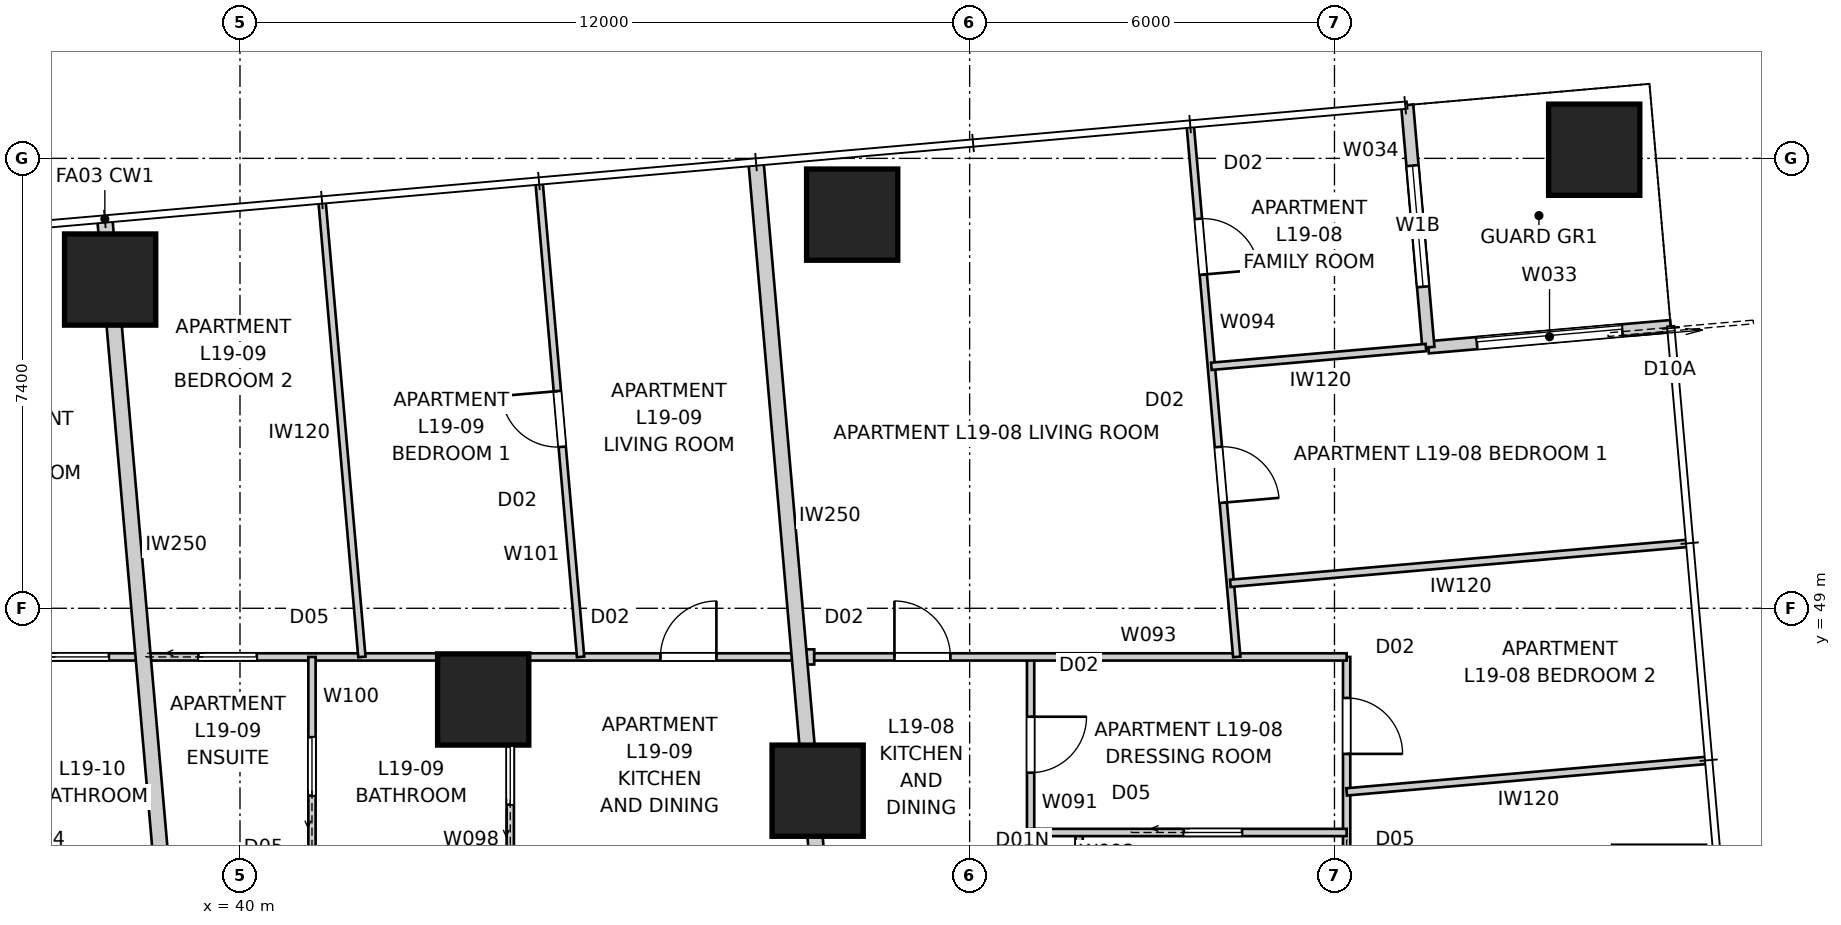
"""IFC4 building model, lengths in metres.
Left out: names, types, materials, properties, quantities, classifications, styles, units other than length and angle.
Written with IfcOpenShell. Run it as: python <this file> out.ifc"""

import sys

from ifc_helpers import new_model, si_unit, direction, frame, frame_2d, origin, origin_2d, place, context, subcontext, project, spatial, rectangle, extrude, element, fill, save


model = new_model("IFC4")
c1 = context("Model", 3, precision=1e-05, world=origin(), true_north=direction((0.0, 1.0)))
c2 = subcontext(c1, "Body", "Model", "MODEL_VIEW")
j1 = project(units=[si_unit("LENGTHUNIT", "METRE"), si_unit("PLANEANGLEUNIT", "RADIAN")], contexts=[c1])
p1 = place(None, origin())
s1 = spatial("IfcSite", under=j1, at=p1, CompositionType="ELEMENT")
p2 = place(p1, origin())
s2 = spatial("IfcBuilding", under=s1, at=p2, CompositionType="ELEMENT")
p3 = place(p2, frame((0.0, 0.0, 71.0)))
s3 = spatial("IfcBuildingStorey", under=s2, at=p3, CompositionType="ELEMENT", Elevation=71.0)
for number, where, z_axis, x_axis in (
    (1, (62.271, 56.542, 0.0), (0.0, 0.0, 1.0), (1.0, 0.0, 0.0)),
    (2, (50.068, 55.474, 0.0), (0.0, 0.0, 1.0), (1.0, 0.0, 0.0)),
    (3, (37.865, 54.407, 0.0), (0.0, 0.0, 1.0), (1.0, 0.0, 0.0)),
):
    element("IfcColumn", number, at=place(p3, frame(where, z_axis=z_axis, x_axis=x_axis)), inside=s3, PredefinedType="COLUMN", context=c2, shape_type="SweptSolid", body=[
        extrude(rectangle(XDim=1.5, YDim=1.5, at=origin_2d()), origin(), (0.0, 0.0, 1.0), 3.2),
    ])
for number, where, z_axis, x_axis in (
    (4, (49.5, 46.0, 0.0), (0.0, 0.0, 1.0), (1.0, 0.0, 0.0)),
    (5, (44.0, 47.5, 0.0), (0.0, 0.0, 1.0), (1.0, 0.0, 0.0)),
):
    element("IfcColumn", number, at=place(p3, frame(where, z_axis=z_axis, x_axis=x_axis)), inside=s3, PredefinedType="COLUMN", context=c2, shape_type="SweptSolid", body=[
        extrude(rectangle(XDim=1.5, YDim=1.5, at=origin_2d()), origin(), (0.0, 0.0, 1.0), 3.4),
    ])
p4 = place(p3, frame((63.529, 53.641, 0.0), z_axis=(0.0, 0.0, 1.0), x_axis=(-0.99619418125, -0.087161650072, 0.0)))
e6 = element("IfcWall", 6, at=p4, inside=s3, PredefinedType="SOLIDWALL", context=c2, shape_type="SweptSolid", body=[
    extrude(rectangle(XDim=4.0, YDim=0.2, at=frame_2d((2.0, 0.0))), origin(), (0.0, 0.0, 1.0), 3.2),
])
p5 = place(p4, frame((0.8, 0.0, 0.0)))
e7 = element("IfcOpeningElement", 7, at=p5, cuts=e6, PredefinedType="OPENING", context=c2, shape_type="SweptSolid", body=[
    extrude(rectangle(XDim=2.4, YDim=2.1, at=frame_2d((1.2, 1.05))), frame((0.0, 0.11, 0.0), z_axis=(0.0, -1.0, 0.0), x_axis=(1.0, 0.0, 0.0)), (0.0, 0.0, 1.0), 0.22),
])
p6 = place(p3, frame((59.544, 53.292, 0.0), z_axis=(0.0, 0.0, 1.0), x_axis=(-0.087156350505, 0.99619464492, 0.0)))
e8 = element("IfcWall", 8, at=p6, inside=s3, PredefinedType="SOLIDWALL", context=c2, shape_type="SweptSolid", body=[
    extrude(rectangle(XDim=4.0, YDim=0.2, at=frame_2d((2.0, 0.0))), origin(), (0.0, 0.0, 1.0), 3.2),
])
p7 = place(p6, frame((1.0, 0.0, 0.4)))
e9 = element("IfcOpeningElement", 9, at=p7, cuts=e8, PredefinedType="OPENING", context=c2, shape_type="SweptSolid", body=[
    extrude(rectangle(XDim=2.0, YDim=1.8, at=frame_2d((1.0, 0.9))), frame((0.0, 0.11, 0.0), z_axis=(0.0, -1.0, 0.0), x_axis=(1.0, 0.0, 0.0)), (0.0, 0.0, 1.0), 0.22),
])
p8 = place(p3, frame((48.487, 56.34, 0.0), z_axis=(0.0, 0.0, 1.0), x_axis=(0.087168232078, -0.996193605338, 0.0)))
e10 = element("IfcWall", 10, at=p8, inside=s3, PredefinedType="PARTITIONING", context=c2, shape_type="SweptSolid", body=[
    extrude(rectangle(XDim=11.814, YDim=0.25, at=frame_2d((5.907, 0.0))), origin(), (0.0, 0.0, 1.0), 3.2),
])
p9 = place(p3, frame((37.778, 55.403, 0.0), z_axis=(0.0, 0.0, 1.0), x_axis=(0.087140211333, -0.996196056792, 0.0)))
e11 = element("IfcWall", 11, at=p9, inside=s3, PredefinedType="PARTITIONING", context=c2, shape_type="SweptSolid", body=[
    extrude(rectangle(XDim=10.873, YDim=0.25, at=frame_2d((5.437, 0.0))), origin(), (0.0, 0.0, 1.0), 3.2),
])
p10 = place(p3, frame((49.223, 48.2, 0.0), z_axis=(0.0, 0.0, 1.0), x_axis=(0.999999388167, -0.001106194013, 0.0)))
e12 = element("IfcWall", 12, at=p10, inside=s3, PredefinedType="PARTITIONING", context=c2, shape_type="SweptSolid", body=[
    extrude(rectangle(XDim=0.221, YDim=0.25, at=frame_2d((0.11, 0.0))), origin(), (0.0, 0.0, 1.0), 3.2),
])
p11 = place(p3, frame((58.2, 48.2, 0.0), z_axis=(0.0, 0.0, 1.0), x_axis=(0.0, -1.0, 0.0)))
e13 = element("IfcWall", 13, at=p11, inside=s3, PredefinedType="PARTITIONING", context=c2, shape_type="SweptSolid", body=[
    extrude(rectangle(XDim=20.7, YDim=0.12, at=frame_2d((10.35, 0.0))), origin(), (0.0, 0.0, 1.0), 3.2),
])
p12 = place(p11, frame((15.095, 0.0, 0.0)))
e14 = element("IfcOpeningElement", 14, at=p12, cuts=e13, PredefinedType="OPENING", context=c2, shape_type="SweptSolid", body=[
    extrude(rectangle(XDim=0.92, YDim=2.34, at=frame_2d((0.46, 1.17))), frame((0.0, 0.07, 0.0), z_axis=(0.0, -1.0, 0.0), x_axis=(1.0, 0.0, 0.0)), (0.0, 0.0, 1.0), 0.14),
])
p13 = place(p11, frame((18.521, 0.0, 0.0)))
e15 = element("IfcOpeningElement", 15, at=p13, cuts=e13, PredefinedType="OPENING", context=c2, shape_type="SweptSolid", body=[
    extrude(rectangle(XDim=0.96, YDim=2.1, at=frame_2d((0.48, 1.05))), frame((0.0, 0.07, 0.0), z_axis=(0.0, -1.0, 0.0), x_axis=(1.0, 0.0, 0.0)), (0.0, 0.0, 1.0), 0.14),
])
p14 = place(p11, frame((0.675, 0.0, 0.0)))
e16 = element("IfcOpeningElement", 16, at=p14, cuts=e13, PredefinedType="OPENING", context=c2, shape_type="SweptSolid", body=[
    extrude(rectangle(XDim=0.92, YDim=2.34, at=frame_2d((0.46, 1.17))), frame((0.0, 0.07, 0.0), z_axis=(0.0, -1.0, 0.0), x_axis=(1.0, 0.0, 0.0)), (0.0, 0.0, 1.0), 0.14),
])
p15 = place(p11, frame((3.872, 0.0, 0.0)))
e17 = element("IfcOpeningElement", 17, at=p15, cuts=e13, PredefinedType="OPENING", context=c2, shape_type="SweptSolid", body=[
    extrude(rectangle(XDim=0.96, YDim=2.1, at=frame_2d((0.48, 1.05))), frame((0.0, 0.07, 0.0), z_axis=(0.0, -1.0, 0.0), x_axis=(1.0, 0.0, 0.0)), (0.0, 0.0, 1.0), 0.14),
])
p16 = place(p3, frame((53.8, 45.312, 0.0), z_axis=(0.0, 0.0, 1.0), x_axis=(0.0, -1.0, 0.0)))
e18 = element("IfcWall", 18, at=p16, inside=s3, PredefinedType="PARTITIONING", context=c2, shape_type="SweptSolid", body=[
    extrude(rectangle(XDim=0.812, YDim=0.12, at=frame_2d((0.406, 0.0))), origin(), (0.0, 0.0, 1.0), 3.2),
])
p17 = place(p3, frame((53.002, 48.2, 0.0), z_axis=(0.0, 0.0, 1.0), x_axis=(0.0, -1.0, 0.0)))
e19 = element("IfcWall", 19, at=p17, inside=s3, PredefinedType="PARTITIONING", context=c2, shape_type="SweptSolid", body=[
    extrude(rectangle(XDim=2.887, YDim=0.12, at=frame_2d((1.444, 0.0))), origin(), (0.0, 0.0, 1.0), 2.399),
])
p18 = place(p17, frame((0.984, 0.0, 0.0)))
e20 = element("IfcOpeningElement", 20, at=p18, cuts=e19, PredefinedType="OPENING", context=c2, shape_type="SweptSolid", body=[
    extrude(rectangle(XDim=0.92, YDim=2.34, at=frame_2d((0.46, 1.17))), frame((0.0, 0.07, 0.0), z_axis=(0.0, -1.0, 0.0), x_axis=(1.0, 0.0, 0.0)), (0.0, 0.0, 1.0), 0.14),
])
p19 = place(p3, frame((53.002, 45.312, 0.0), z_axis=(0.0, 0.0, 1.0), x_axis=(1.0, 0.0, 0.0)))
e21 = element("IfcWall", 21, at=p19, inside=s3, PredefinedType="PARTITIONING", context=c2, shape_type="SweptSolid", body=[
    extrude(rectangle(XDim=5.198, YDim=0.12, at=frame_2d((2.599, 0.0))), origin(), (0.0, 0.0, 1.0), 3.2),
])
p20 = place(p19, frame((2.518, 0.0, 0.0)))
e22 = element("IfcOpeningElement", 22, at=p20, cuts=e21, PredefinedType="OPENING", context=c2, shape_type="SweptSolid", body=[
    extrude(rectangle(XDim=0.96, YDim=2.1, at=frame_2d((0.48, 1.05))), frame((0.0, 0.07, 0.0), z_axis=(0.0, -1.0, 0.0), x_axis=(1.0, 0.0, 0.0)), (0.0, 0.0, 1.0), 0.14),
])
p21 = place(p3, frame((49.444, 48.2, 0.0), z_axis=(0.0, 0.0, 1.0), x_axis=(1.0, 0.0, 0.0)))
e23 = element("IfcWall", 23, at=p21, inside=s3, PredefinedType="PARTITIONING", context=c2, shape_type="SweptSolid", body=[
    extrude(rectangle(XDim=8.756, YDim=0.12, at=frame_2d((4.378, 0.0))), origin(), (0.0, 0.0, 1.0), 3.2),
])
p22 = place(p21, frame((1.319, 0.0, 0.0)))
e24 = element("IfcOpeningElement", 24, at=p22, cuts=e23, PredefinedType="OPENING", context=c2, shape_type="SweptSolid", body=[
    extrude(rectangle(XDim=0.92, YDim=2.34, at=frame_2d((0.46, 1.17))), frame((0.0, 0.07, 0.0), z_axis=(0.0, -1.0, 0.0), x_axis=(1.0, 0.0, 0.0)), (0.0, 0.0, 1.0), 0.14),
])
p23 = place(p3, frame((55.629, 56.925, 0.0), z_axis=(0.0, 0.0, 1.0), x_axis=(0.087169716747, -0.996193475426, 0.0)))
e25 = element("IfcWall", 25, at=p23, inside=s3, PredefinedType="PARTITIONING", context=c2, shape_type="SweptSolid", body=[
    extrude(rectangle(XDim=8.758, YDim=0.12, at=frame_2d((4.379, 0.0))), origin(), (0.0, 0.0, 1.0), 3.2),
])
p24 = place(p23, frame((1.525, 0.0, 0.0)))
e26 = element("IfcOpeningElement", 26, at=p24, cuts=e25, PredefinedType="OPENING", context=c2, shape_type="SweptSolid", body=[
    extrude(rectangle(XDim=0.92, YDim=2.34, at=frame_2d((0.46, 1.17))), frame((0.0, 0.07, 0.0), z_axis=(0.0, -1.0, 0.0), x_axis=(1.0, 0.0, 0.0)), (0.0, 0.0, 1.0), 0.14),
])
p25 = place(p23, frame((5.292, 0.0, 0.0)))
e27 = element("IfcOpeningElement", 27, at=p25, cuts=e25, PredefinedType="OPENING", context=c2, shape_type="SweptSolid", body=[
    extrude(rectangle(XDim=0.92, YDim=2.34, at=frame_2d((0.46, 1.17))), frame((0.0, 0.07, 0.0), z_axis=(0.0, -1.0, 0.0), x_axis=(1.0, 0.0, 0.0)), (0.0, 0.0, 1.0), 0.14),
])
p26 = place(p3, frame((63.802, 50.067, 0.0), z_axis=(0.0, 0.0, 1.0), x_axis=(-0.996194420069, -0.087158920508, 0.0)))
e28 = element("IfcWall", 28, at=p26, inside=s3, PredefinedType="PARTITIONING", context=c2, shape_type="SweptSolid", body=[
    extrude(rectangle(XDim=7.543, YDim=0.12, at=frame_2d((3.772, 0.0))), origin(), (0.0, 0.0, 1.0), 3.2),
])
p27 = place(p3, frame((55.975, 52.98, 0.0), z_axis=(0.0, 0.0, 1.0), x_axis=(0.996194166221, 0.087161821847, 0.0)))
e29 = element("IfcWall", 29, at=p27, inside=s3, PredefinedType="PARTITIONING", context=c2, shape_type="SweptSolid", body=[
    extrude(rectangle(XDim=3.543, YDim=0.12, at=frame_2d((1.771, 0.0))), origin(), (0.0, 0.0, 1.0), 3.2),
])
p28 = place(p3, frame((64.114, 46.498, 0.0), z_axis=(0.0, 0.0, 1.0), x_axis=(-0.996195547509, -0.087146033323, 0.0)))
e30 = element("IfcWall", 30, at=p28, inside=s3, PredefinedType="PARTITIONING", context=c2, shape_type="SweptSolid", body=[
    extrude(rectangle(XDim=5.937, YDim=0.12, at=frame_2d((2.968, 0.0))), origin(), (0.0, 0.0, 1.0), 2.399),
])
p29 = place(p3, frame((44.445, 44.6, 0.0), z_axis=(0.0, 0.0, 1.0), x_axis=(0.0, 1.0, 0.0)))
e31 = element("IfcWall", 31, at=p29, inside=s3, PredefinedType="PARTITIONING", context=c2, shape_type="SweptSolid", body=[
    extrude(rectangle(XDim=3.6, YDim=0.12, at=frame_2d((1.8, 0.0))), origin(), (0.0, 0.0, 1.0), 3.2),
])
p30 = place(p29, frame((1.17, 0.0, 0.0)))
e32 = element("IfcOpeningElement", 32, at=p30, cuts=e31, PredefinedType="OPENING", context=c2, shape_type="SweptSolid", body=[
    extrude(rectangle(XDim=0.96, YDim=2.1, at=frame_2d((0.48, 1.05))), frame((0.0, 0.07, 0.0), z_axis=(0.0, -1.0, 0.0), x_axis=(1.0, 0.0, 0.0)), (0.0, 0.0, 1.0), 0.14),
])
p31 = place(p3, frame((21.8, 48.2, 0.0), z_axis=(0.0, 0.0, 1.0), x_axis=(1.0, 0.0, 0.0)))
e33 = element("IfcWall", 33, at=p31, inside=s3, PredefinedType="PARTITIONING", context=c2, shape_type="SweptSolid", body=[
    extrude(rectangle(XDim=27.399, YDim=0.12, at=frame_2d((13.699, 0.0))), origin(), (0.0, 0.0, 1.0), 3.2),
])
p32 = place(p31, frame((7.18, 0.0, 0.0)))
e34 = element("IfcOpeningElement", 34, at=p32, cuts=e33, PredefinedType="OPENING", context=c2, shape_type="SweptSolid", body=[
    extrude(rectangle(XDim=0.92, YDim=2.34, at=frame_2d((0.46, 1.17))), frame((0.0, 0.07, 0.0), z_axis=(0.0, -1.0, 0.0), x_axis=(1.0, 0.0, 0.0)), (0.0, 0.0, 1.0), 0.14),
])
p33 = place(p31, frame((10.167, 0.0, 0.0)))
e35 = element("IfcOpeningElement", 35, at=p33, cuts=e33, PredefinedType="OPENING", context=c2, shape_type="SweptSolid", body=[
    extrude(rectangle(XDim=0.92, YDim=2.34, at=frame_2d((0.46, 1.17))), frame((0.0, 0.07, 0.0), z_axis=(0.0, -1.0, 0.0), x_axis=(1.0, 0.0, 0.0)), (0.0, 0.0, 1.0), 0.14),
])
p34 = place(p31, frame((25.115, 0.0, 0.0)))
e36 = element("IfcOpeningElement", 36, at=p34, cuts=e33, PredefinedType="OPENING", context=c2, shape_type="SweptSolid", body=[
    extrude(rectangle(XDim=0.92, YDim=2.34, at=frame_2d((0.46, 1.17))), frame((0.0, 0.07, 0.0), z_axis=(0.0, -1.0, 0.0), x_axis=(1.0, 0.0, 0.0)), (0.0, 0.0, 1.0), 0.14),
])
p35 = place(p31, frame((3.513, 0.0, 0.0)))
e37 = element("IfcOpeningElement", 37, at=p35, cuts=e33, PredefinedType="OPENING", context=c2, shape_type="SweptSolid", body=[
    extrude(rectangle(XDim=0.96, YDim=2.1, at=frame_2d((0.48, 1.05))), frame((0.0, 0.07, 0.0), z_axis=(0.0, -1.0, 0.0), x_axis=(1.0, 0.0, 0.0)), (0.0, 0.0, 1.0), 0.14),
])
p36 = place(p31, frame((0.655, 0.0, 0.0)))
e38 = element("IfcOpeningElement", 38, at=p36, cuts=e33, PredefinedType="OPENING", context=c2, shape_type="SweptSolid", body=[
    extrude(rectangle(XDim=0.96, YDim=2.1, at=frame_2d((0.48, 1.05))), frame((0.0, 0.07, 0.0), z_axis=(0.0, -1.0, 0.0), x_axis=(1.0, 0.0, 0.0)), (0.0, 0.0, 1.0), 0.14),
])
p37 = place(p31, frame((15.083, 0.0, 0.0)))
e39 = element("IfcOpeningElement", 39, at=p37, cuts=e33, PredefinedType="OPENING", context=c2, shape_type="SweptSolid", body=[
    extrude(rectangle(XDim=0.96, YDim=2.1, at=frame_2d((0.48, 1.05))), frame((0.0, 0.07, 0.0), z_axis=(0.0, -1.0, 0.0), x_axis=(1.0, 0.0, 0.0)), (0.0, 0.0, 1.0), 0.14),
])
p38 = place(p31, frame((17.516, 0.0, 0.0)))
e40 = element("IfcOpeningElement", 40, at=p38, cuts=e33, PredefinedType="OPENING", context=c2, shape_type="SweptSolid", body=[
    extrude(rectangle(XDim=0.96, YDim=2.1, at=frame_2d((0.48, 1.05))), frame((0.0, 0.07, 0.0), z_axis=(0.0, -1.0, 0.0), x_axis=(1.0, 0.0, 0.0)), (0.0, 0.0, 1.0), 0.14),
])
p39 = place(p3, frame((41.184, 44.6, 0.0), z_axis=(0.0, 0.0, 1.0), x_axis=(0.0, 1.0, 0.0)))
e41 = element("IfcWall", 41, at=p39, inside=s3, PredefinedType="PARTITIONING", context=c2, shape_type="SweptSolid", body=[
    extrude(rectangle(XDim=3.6, YDim=0.12, at=frame_2d((1.8, 0.0))), origin(), (0.0, 0.0, 1.0), 3.2),
])
p40 = place(p39, frame((1.32, 0.0, 0.0)))
e42 = element("IfcOpeningElement", 42, at=p40, cuts=e41, PredefinedType="OPENING", context=c2, shape_type="SweptSolid", body=[
    extrude(rectangle(XDim=0.96, YDim=2.1, at=frame_2d((0.48, 1.05))), frame((0.0, 0.07, 0.0), z_axis=(0.0, -1.0, 0.0), x_axis=(1.0, 0.0, 0.0)), (0.0, 0.0, 1.0), 0.14),
])
p41 = place(p3, frame((45.602, 48.2, 0.0), z_axis=(0.0, 0.0, 1.0), x_axis=(-0.087161914023, 0.996194158156, 0.0)))
e43 = element("IfcWall", 43, at=p41, inside=s3, PredefinedType="PARTITIONING", context=c2, shape_type="SweptSolid", body=[
    extrude(rectangle(XDim=7.818, YDim=0.12, at=frame_2d((3.909, 0.0))), origin(), (0.0, 0.0, 1.0), 2.588),
])
p42 = place(p41, frame((3.469, 0.0, 0.0)))
e44 = element("IfcOpeningElement", 44, at=p42, cuts=e43, PredefinedType="OPENING", context=c2, shape_type="SweptSolid", body=[
    extrude(rectangle(XDim=0.92, YDim=2.34, at=frame_2d((0.46, 1.17))), frame((0.0, 0.07, 0.0), z_axis=(0.0, -1.0, 0.0), x_axis=(1.0, 0.0, 0.0)), (0.0, 0.0, 1.0), 0.14),
])
p43 = place(p3, frame((42.005, 48.2, 0.0), z_axis=(0.0, 0.0, 1.0), x_axis=(-0.08715887855, 0.99619442374, 0.0)))
e45 = element("IfcWall", 45, at=p43, inside=s3, PredefinedType="PARTITIONING", context=c2, shape_type="SweptSolid", body=[
    extrude(rectangle(XDim=7.504, YDim=0.12, at=frame_2d((3.752, 0.0))), origin(), (0.0, 0.0, 1.0), 3.2),
])
p44 = place(p5, origin())
e46 = element("IfcDoor", 46, at=p44, inside=s3, OperationType="SLIDING_TO_LEFT", PredefinedType="DOOR", context=c2, shape_type="SweptSolid", body=[
    extrude(rectangle(XDim=2.4, YDim=2.1, at=frame_2d((1.2, 1.05))), frame((0.0, 0.025, 0.0), z_axis=(0.0, -1.0, 0.0), x_axis=(1.0, 0.0, 0.0)), (0.0, 0.0, 1.0), 0.05),
])
fill(e7, e46)
p45 = place(p7, origin())
e47 = element("IfcWindow", 47, at=p45, inside=s3, PartitioningType="SINGLE_PANEL", PredefinedType="WINDOW", context=c2, shape_type="SweptSolid", body=[
    extrude(rectangle(XDim=2.0, YDim=1.8, at=frame_2d((1.0, 0.9))), frame((0.0, 0.03, 0.0), z_axis=(0.0, -1.0, 0.0), x_axis=(1.0, 0.0, 0.0)), (0.0, 0.0, 1.0), 0.06),
])
fill(e9, e47)
p46 = place(p34, origin())
e48 = element("IfcDoor", 48, at=p46, inside=s3, OperationType="SINGLE_SWING_RIGHT", PredefinedType="DOOR", context=c2, shape_type="SweptSolid", body=[
    extrude(rectangle(XDim=0.92, YDim=2.34, at=frame_2d((0.46, 1.17))), frame((0.0, 0.025, 0.0), z_axis=(0.0, -1.0, 0.0), x_axis=(1.0, 0.0, 0.0)), (0.0, 0.0, 1.0), 0.05),
])
fill(e36, e48)
p47 = place(p30, origin())
e49 = element("IfcDoor", 49, at=p47, inside=s3, OperationType="SLIDING_TO_LEFT", PredefinedType="DOOR", context=c2, shape_type="SweptSolid", body=[
    extrude(rectangle(XDim=0.96, YDim=2.1, at=frame_2d((0.48, 1.05))), frame((0.0, 0.025, 0.0), z_axis=(0.0, -1.0, 0.0), x_axis=(1.0, 0.0, 0.0)), (0.0, 0.0, 1.0), 0.05),
])
fill(e32, e49)
p48 = place(p22, origin())
e50 = element("IfcDoor", 50, at=p48, inside=s3, OperationType="SINGLE_SWING_LEFT", PredefinedType="DOOR", context=c2, shape_type="SweptSolid", body=[
    extrude(rectangle(XDim=0.92, YDim=2.34, at=frame_2d((0.46, 1.17))), frame((0.0, 0.025, 0.0), z_axis=(0.0, -1.0, 0.0), x_axis=(1.0, 0.0, 0.0)), (0.0, 0.0, 1.0), 0.05),
])
fill(e24, e50)
p49 = place(p18, origin())
e51 = element("IfcDoor", 51, at=p49, inside=s3, OperationType="SINGLE_SWING_LEFT", PredefinedType="DOOR", context=c2, shape_type="SweptSolid", body=[
    extrude(rectangle(XDim=0.92, YDim=2.34, at=frame_2d((0.46, 1.17))), frame((0.0, 0.025, 0.0), z_axis=(0.0, -1.0, 0.0), x_axis=(1.0, 0.0, 0.0)), (0.0, 0.0, 1.0), 0.05),
])
fill(e20, e51)
p50 = place(p42, origin())
e52 = element("IfcDoor", 52, at=p50, inside=s3, OperationType="SINGLE_SWING_RIGHT", PredefinedType="DOOR", context=c2, shape_type="SweptSolid", body=[
    extrude(rectangle(XDim=0.92, YDim=2.34, at=frame_2d((0.46, 1.17))), frame((0.0, 0.025, 0.0), z_axis=(0.0, -1.0, 0.0), x_axis=(1.0, 0.0, 0.0)), (0.0, 0.0, 1.0), 0.05),
])
fill(e44, e52)
p51 = place(p40, origin())
e53 = element("IfcDoor", 53, at=p51, inside=s3, OperationType="SLIDING_TO_LEFT", PredefinedType="DOOR", context=c2, shape_type="SweptSolid", body=[
    extrude(rectangle(XDim=0.96, YDim=2.1, at=frame_2d((0.48, 1.05))), frame((0.0, 0.025, 0.0), z_axis=(0.0, -1.0, 0.0), x_axis=(1.0, 0.0, 0.0)), (0.0, 0.0, 1.0), 0.05),
])
fill(e42, e53)
p52 = place(p24, origin())
e54 = element("IfcDoor", 54, at=p52, inside=s3, OperationType="SINGLE_SWING_RIGHT", PredefinedType="DOOR", context=c2, shape_type="SweptSolid", body=[
    extrude(rectangle(XDim=0.92, YDim=2.34, at=frame_2d((0.46, 1.17))), frame((0.0, 0.025, 0.0), z_axis=(0.0, -1.0, 0.0), x_axis=(1.0, 0.0, 0.0)), (0.0, 0.0, 1.0), 0.05),
])
fill(e26, e54)
p53 = place(p25, origin())
e55 = element("IfcDoor", 55, at=p53, inside=s3, OperationType="SINGLE_SWING_RIGHT", PredefinedType="DOOR", context=c2, shape_type="SweptSolid", body=[
    extrude(rectangle(XDim=0.92, YDim=2.34, at=frame_2d((0.46, 1.17))), frame((0.0, 0.025, 0.0), z_axis=(0.0, -1.0, 0.0), x_axis=(1.0, 0.0, 0.0)), (0.0, 0.0, 1.0), 0.05),
])
fill(e27, e55)
p54 = place(p20, origin())
e56 = element("IfcDoor", 56, at=p54, inside=s3, OperationType="SLIDING_TO_LEFT", PredefinedType="DOOR", context=c2, shape_type="SweptSolid", body=[
    extrude(rectangle(XDim=0.96, YDim=2.1, at=frame_2d((0.48, 1.05))), frame((0.0, 0.025, 0.0), z_axis=(0.0, -1.0, 0.0), x_axis=(1.0, 0.0, 0.0)), (0.0, 0.0, 1.0), 0.05),
])
fill(e22, e56)
p55 = place(p14, origin())
e57 = element("IfcDoor", 57, at=p55, inside=s3, OperationType="SINGLE_SWING_RIGHT", PredefinedType="DOOR", context=c2, shape_type="SweptSolid", body=[
    extrude(rectangle(XDim=0.92, YDim=2.34, at=frame_2d((0.46, 1.17))), frame((0.0, 0.025, 0.0), z_axis=(0.0, -1.0, 0.0), x_axis=(1.0, 0.0, 0.0)), (0.0, 0.0, 1.0), 0.05),
])
fill(e16, e57)
p56 = place(p37, origin())
e58 = element("IfcDoor", 58, at=p56, inside=s3, OperationType="SLIDING_TO_LEFT", PredefinedType="DOOR", context=c2, shape_type="SweptSolid", body=[
    extrude(rectangle(XDim=0.96, YDim=2.1, at=frame_2d((0.48, 1.05))), frame((0.0, 0.025, 0.0), z_axis=(0.0, -1.0, 0.0), x_axis=(1.0, 0.0, 0.0)), (0.0, 0.0, 1.0), 0.05),
])
fill(e39, e58)
p57 = place(p38, origin())
e59 = element("IfcDoor", 59, at=p57, inside=s3, OperationType="SLIDING_TO_LEFT", PredefinedType="DOOR", context=c2, shape_type="SweptSolid", body=[
    extrude(rectangle(XDim=0.96, YDim=2.1, at=frame_2d((0.48, 1.05))), frame((0.0, 0.025, 0.0), z_axis=(0.0, -1.0, 0.0), x_axis=(1.0, 0.0, 0.0)), (0.0, 0.0, 1.0), 0.05),
])
fill(e40, e59)
save(model, sys.argv[1])
